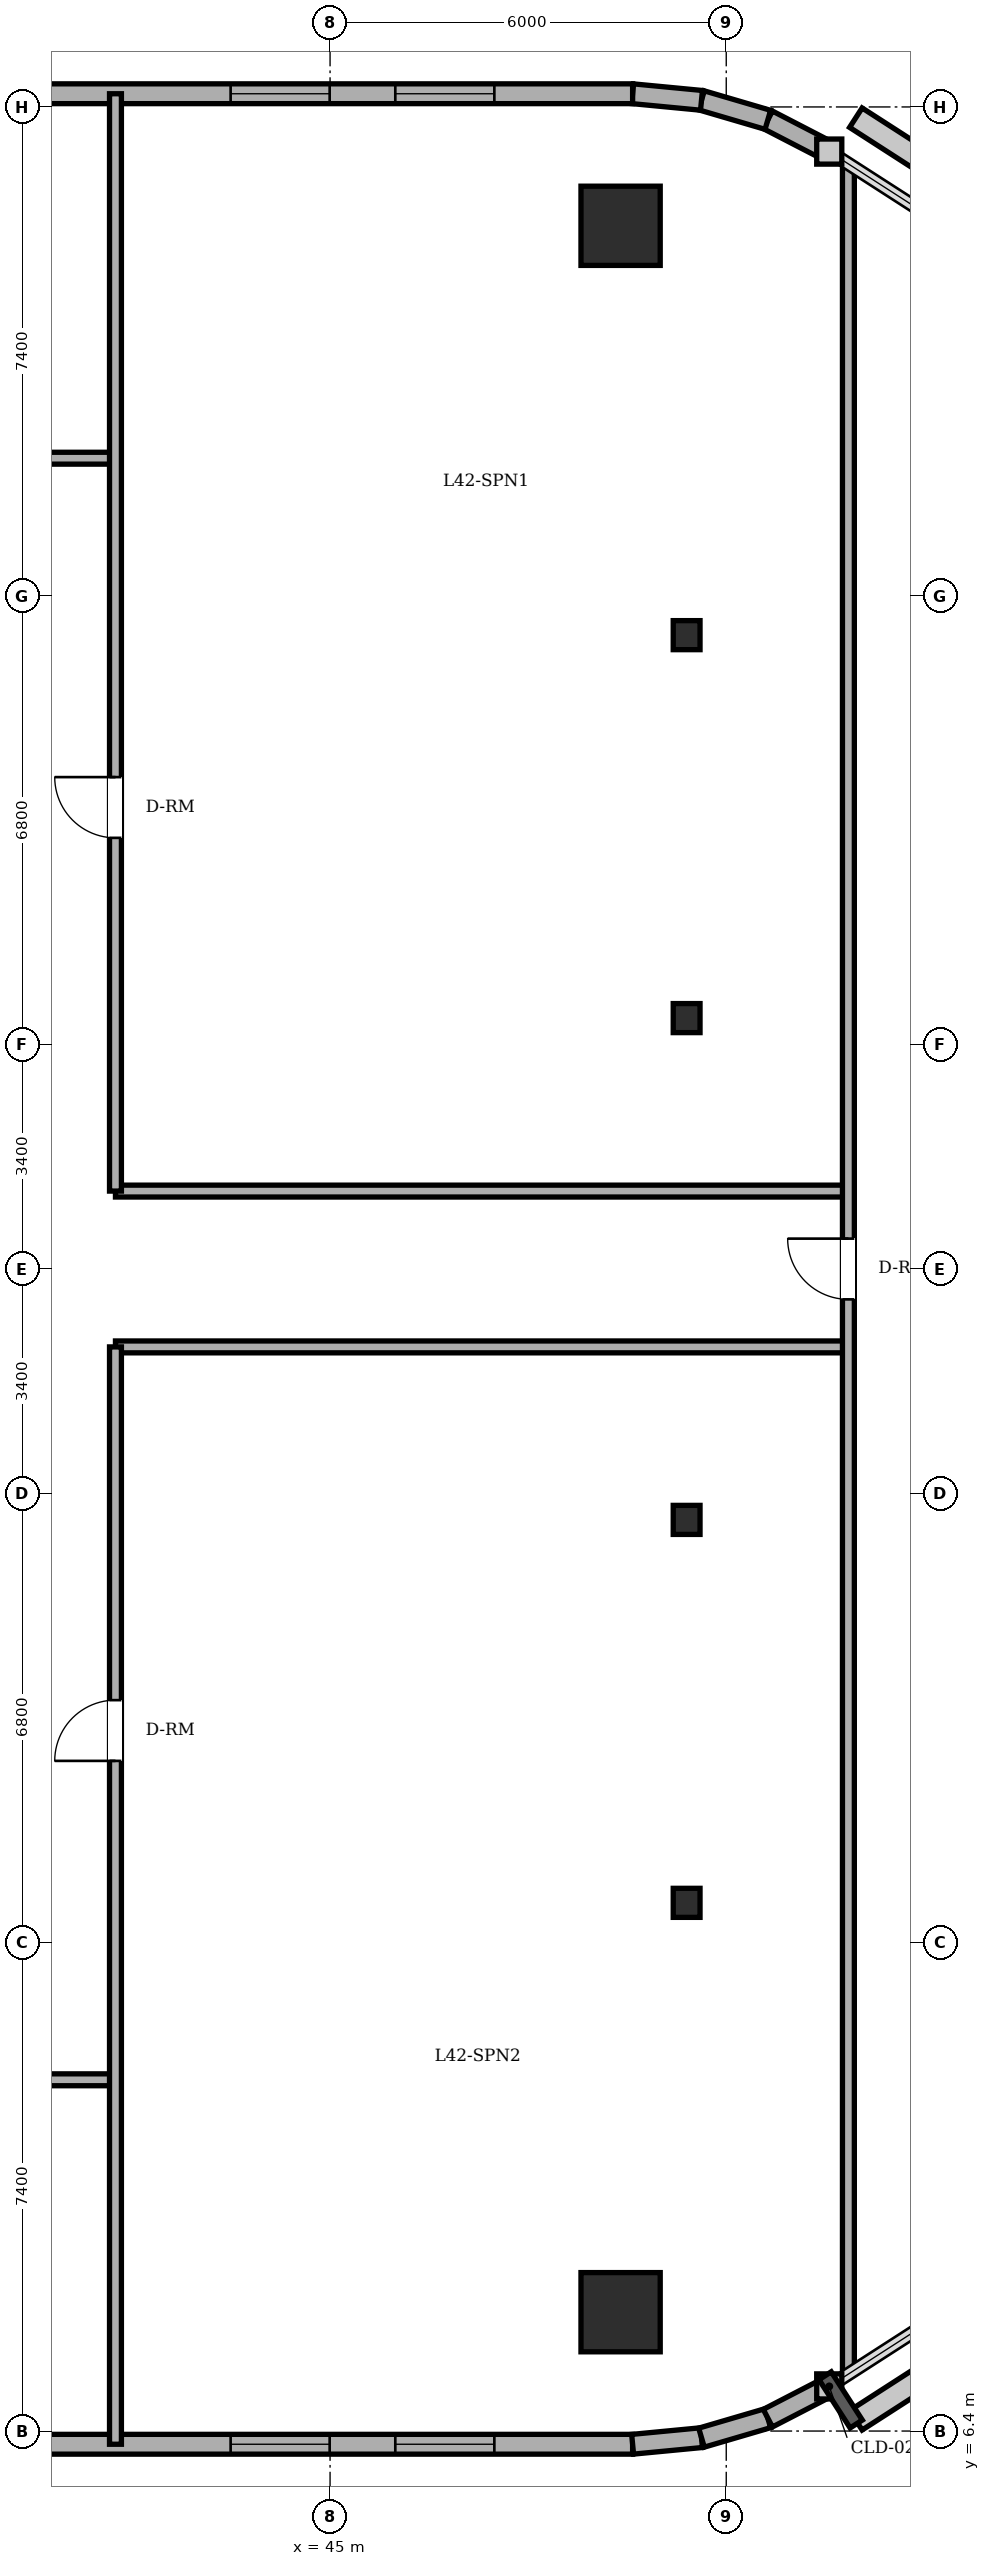
"""IFC4 building model, lengths in metres.
Left out: names, types, materials, properties, quantities, classifications, styles, units other than length and angle.
Written with IfcOpenShell. Run it as: python <this file> out.ifc"""

import sys

from ifc_helpers import new_model, si_unit, direction, frame, frame_2d, origin, origin_2d, place, context, subcontext, project, spatial, rectangle, circle, i_section, extrude, element, fill, save


model = new_model("IFC4")
c1 = context("Model", 3, precision=1e-05, world=origin(), true_north=direction((0.0, 1.0)))
c2 = subcontext(c1, "Body", "Model", "MODEL_VIEW")
j1 = project(units=[si_unit("LENGTHUNIT", "METRE"), si_unit("PLANEANGLEUNIT", "RADIAN")], contexts=[c1])
p1 = place(None, origin())
s1 = spatial("IfcSite", under=j1, at=p1, CompositionType="ELEMENT")
p2 = place(p1, origin())
s2 = spatial("IfcBuilding", under=s1, at=p2, CompositionType="ELEMENT")
p3 = place(p2, frame((0.0, 0.0, 161.8)))
s3 = spatial("IfcBuildingStorey", under=s2, at=p3, CompositionType="ELEMENT", Elevation=161.8)
for number, where, z_axis, x_axis in (
    (1, (49.4, 8.2, 0.0), (0.0, 0.0, 1.0), (1.0, 0.0, 0.0)),
    (2, (49.4, 39.8, 0.0), (0.0, 0.0, 1.0), (1.0, 0.0, 0.0)),
):
    element("IfcColumn", number, at=place(p3, frame(where, z_axis=z_axis, x_axis=x_axis)), inside=s3, PredefinedType="COLUMN", context=c2, shape_type="SweptSolid", body=[
        extrude(circle(Radius=0.6, at=origin_2d()), origin(), (0.0, 0.0, 1.0), 3.6),
    ])
for number, where, z_axis, x_axis in (
    (3, (50.4, 14.4, 0.0), (0.0, 0.0, 1.0), (1.0, 0.0, 0.0)),
    (4, (50.4, 20.2, 0.0), (0.0, 0.0, 1.0), (1.0, 0.0, 0.0)),
    (5, (50.4, 27.8, 0.0), (0.0, 0.0, 1.0), (1.0, 0.0, 0.0)),
    (6, (50.4, 33.6, 0.0), (0.0, 0.0, 1.0), (1.0, 0.0, 0.0)),
):
    element("IfcColumn", number, at=place(p3, frame(where, z_axis=z_axis, x_axis=x_axis)), inside=s3, PredefinedType="COLUMN", context=c2, shape_type="SweptSolid", body=[
        extrude(i_section(OverallWidth=0.406, OverallDepth=0.44, WebThickness=0.024, FlangeThickness=0.039, FilletRadius=0.015, at=origin_2d()), origin(), (0.0, 0.0, 1.0), 3.6),
    ])
p4 = place(p3, frame((19.3, 6.2, 0.0), z_axis=(0.0, 0.0, 1.0), x_axis=(1.0, 0.0, 0.0)))
e7 = element("IfcWall", 7, at=p4, inside=s3, PredefinedType="SOLIDWALL", context=c2, shape_type="SweptSolid", body=[
    extrude(rectangle(XDim=30.282, YDim=0.3, at=frame_2d((15.141, 0.0))), origin(), (0.0, 0.0, 1.0), 3.4),
])
p5 = place(p4, frame((10.1, 0.0, 0.0)))
e8 = element("IfcOpeningElement", 8, at=p5, cuts=e7, PredefinedType="OPENING", context=c2, shape_type="SweptSolid", body=[
    extrude(rectangle(XDim=0.95, YDim=2.2, at=frame_2d((0.475, 1.1))), frame((0.0, 0.16, 0.0), z_axis=(0.0, -1.0, 0.0), x_axis=(1.0, 0.0, 0.0)), (0.0, 0.0, 1.0), 0.32),
])
p6 = place(p4, frame((1.25, 0.0, 0.85)))
e9 = element("IfcOpeningElement", 9, at=p6, cuts=e7, PredefinedType="OPENING", context=c2, shape_type="SweptSolid", body=[
    extrude(rectangle(XDim=1.5, YDim=1.55, at=frame_2d((0.75, 0.775))), frame((0.0, 0.16, 0.0), z_axis=(0.0, -1.0, 0.0), x_axis=(1.0, 0.0, 0.0)), (0.0, 0.0, 1.0), 0.32),
])
p7 = place(p4, frame((2.9, 0.0, 0.85)))
e10 = element("IfcOpeningElement", 10, at=p7, cuts=e7, PredefinedType="OPENING", context=c2, shape_type="SweptSolid", body=[
    extrude(rectangle(XDim=1.5, YDim=1.55, at=frame_2d((0.75, 0.775))), frame((0.0, 0.16, 0.0), z_axis=(0.0, -1.0, 0.0), x_axis=(1.0, 0.0, 0.0)), (0.0, 0.0, 1.0), 0.32),
])
p8 = place(p4, frame((6.45, 0.0, 0.85)))
e11 = element("IfcOpeningElement", 11, at=p8, cuts=e7, PredefinedType="OPENING", context=c2, shape_type="SweptSolid", body=[
    extrude(rectangle(XDim=1.5, YDim=1.55, at=frame_2d((0.75, 0.775))), frame((0.0, 0.16, 0.0), z_axis=(0.0, -1.0, 0.0), x_axis=(1.0, 0.0, 0.0)), (0.0, 0.0, 1.0), 0.32),
])
p9 = place(p4, frame((12.8, 0.0, 0.85)))
e12 = element("IfcOpeningElement", 12, at=p9, cuts=e7, PredefinedType="OPENING", context=c2, shape_type="SweptSolid", body=[
    extrude(rectangle(XDim=1.5, YDim=1.55, at=frame_2d((0.75, 0.775))), frame((0.0, 0.16, 0.0), z_axis=(0.0, -1.0, 0.0), x_axis=(1.0, 0.0, 0.0)), (0.0, 0.0, 1.0), 0.32),
])
p10 = place(p4, frame((17.25, 0.0, 0.85)))
e13 = element("IfcOpeningElement", 13, at=p10, cuts=e7, PredefinedType="OPENING", context=c2, shape_type="SweptSolid", body=[
    extrude(rectangle(XDim=1.5, YDim=1.55, at=frame_2d((0.75, 0.775))), frame((0.0, 0.16, 0.0), z_axis=(0.0, -1.0, 0.0), x_axis=(1.0, 0.0, 0.0)), (0.0, 0.0, 1.0), 0.32),
])
p11 = place(p4, frame((24.194, 0.0, 0.85)))
e14 = element("IfcOpeningElement", 14, at=p11, cuts=e7, PredefinedType="OPENING", context=c2, shape_type="SweptSolid", body=[
    extrude(rectangle(XDim=1.5, YDim=1.55, at=frame_2d((0.75, 0.775))), frame((0.0, 0.16, 0.0), z_axis=(0.0, -1.0, 0.0), x_axis=(1.0, 0.0, 0.0)), (0.0, 0.0, 1.0), 0.32),
])
p12 = place(p4, frame((26.688, 0.0, 0.85)))
e15 = element("IfcOpeningElement", 15, at=p12, cuts=e7, PredefinedType="OPENING", context=c2, shape_type="SweptSolid", body=[
    extrude(rectangle(XDim=1.5, YDim=1.55, at=frame_2d((0.75, 0.775))), frame((0.0, 0.16, 0.0), z_axis=(0.0, -1.0, 0.0), x_axis=(1.0, 0.0, 0.0)), (0.0, 0.0, 1.0), 0.32),
])
p13 = place(p3, frame((49.582, 6.2, 0.0), z_axis=(0.0, 0.0, 1.0), x_axis=(0.995426089968, 0.095534807324, 0.0)))
e16 = element("IfcWall", 16, at=p13, inside=s3, PredefinedType="SOLIDWALL", context=c2, shape_type="SweptSolid", body=[
    extrude(rectangle(XDim=1.048, YDim=0.3, at=frame_2d((0.524, 0.0))), origin(), (0.0, 0.0, 1.0), 3.4),
])
p14 = place(p3, frame((50.625, 6.3, 0.0), z_axis=(0.0, 0.0, 1.0), x_axis=(0.959528674476, 0.281610942363, 0.0)))
e17 = element("IfcWall", 17, at=p14, inside=s3, PredefinedType="SOLIDWALL", context=c2, shape_type="SweptSolid", body=[
    extrude(rectangle(XDim=1.047, YDim=0.3, at=frame_2d((0.524, 0.0))), origin(), (0.0, 0.0, 1.0), 3.4),
])
for number, where, z_axis, x_axis in (
    (18, (51.63, 6.595, 0.0), (0.0, 0.0, 1.0), (0.888, 0.459, 0.0)),
    (19, (52.56, 40.924, 0.0), (0.0, 0.0, 1.0), (-0.888, 0.459, 0.0)),
):
    element("IfcWall", number, at=place(p3, frame(where, z_axis=z_axis, x_axis=x_axis)), inside=s3, PredefinedType="SOLIDWALL", context=c2, shape_type="SweptSolid", body=[
        extrude(rectangle(XDim=1.047, YDim=0.3, at=frame_2d((0.523, 0.0))), origin(), (0.0, 0.0, 1.0), 3.4),
    ])
p15 = place(p3, frame((51.63, 41.405, 0.0), z_axis=(0.0, 0.0, 1.0), x_axis=(-0.959528674476, 0.281610942363, 0.0)))
e20 = element("IfcWall", 20, at=p15, inside=s3, PredefinedType="SOLIDWALL", context=c2, shape_type="SweptSolid", body=[
    extrude(rectangle(XDim=1.047, YDim=0.3, at=frame_2d((0.524, 0.0))), origin(), (0.0, 0.0, 1.0), 3.4),
])
p16 = place(p3, frame((50.625, 41.7, 0.0), z_axis=(0.0, 0.0, 1.0), x_axis=(-0.995426089968, 0.095534807324, 0.0)))
e21 = element("IfcWall", 21, at=p16, inside=s3, PredefinedType="SOLIDWALL", context=c2, shape_type="SweptSolid", body=[
    extrude(rectangle(XDim=1.048, YDim=0.3, at=frame_2d((0.524, 0.0))), origin(), (0.0, 0.0, 1.0), 3.4),
])
p17 = place(p3, frame((49.582, 41.8, 0.0), z_axis=(0.0, 0.0, 1.0), x_axis=(-1.0, 0.0, 0.0)))
e22 = element("IfcWall", 22, at=p17, inside=s3, PredefinedType="SOLIDWALL", context=c2, shape_type="SweptSolid", body=[
    extrude(rectangle(XDim=30.282, YDim=0.3, at=frame_2d((15.141, 0.0))), origin(), (0.0, 0.0, 1.0), 3.4),
])
p18 = place(p17, frame((19.232, 0.0, 0.0)))
e23 = element("IfcOpeningElement", 23, at=p18, cuts=e22, PredefinedType="OPENING", context=c2, shape_type="SweptSolid", body=[
    extrude(rectangle(XDim=0.95, YDim=2.2, at=frame_2d((0.475, 1.1))), frame((0.0, 0.16, 0.0), z_axis=(0.0, -1.0, 0.0), x_axis=(1.0, 0.0, 0.0)), (0.0, 0.0, 1.0), 0.32),
])
p19 = place(p17, frame((2.094, 0.0, 0.85)))
e24 = element("IfcOpeningElement", 24, at=p19, cuts=e22, PredefinedType="OPENING", context=c2, shape_type="SweptSolid", body=[
    extrude(rectangle(XDim=1.5, YDim=1.55, at=frame_2d((0.75, 0.775))), frame((0.0, 0.16, 0.0), z_axis=(0.0, -1.0, 0.0), x_axis=(1.0, 0.0, 0.0)), (0.0, 0.0, 1.0), 0.32),
])
p20 = place(p17, frame((4.588, 0.0, 0.85)))
e25 = element("IfcOpeningElement", 25, at=p20, cuts=e22, PredefinedType="OPENING", context=c2, shape_type="SweptSolid", body=[
    extrude(rectangle(XDim=1.5, YDim=1.55, at=frame_2d((0.75, 0.775))), frame((0.0, 0.16, 0.0), z_axis=(0.0, -1.0, 0.0), x_axis=(1.0, 0.0, 0.0)), (0.0, 0.0, 1.0), 0.32),
])
p21 = place(p17, frame((10.399, 0.0, 0.85)))
e26 = element("IfcOpeningElement", 26, at=p21, cuts=e22, PredefinedType="OPENING", context=c2, shape_type="SweptSolid", body=[
    extrude(rectangle(XDim=1.5, YDim=1.55, at=frame_2d((0.75, 0.775))), frame((0.0, 0.16, 0.0), z_axis=(0.0, -1.0, 0.0), x_axis=(1.0, 0.0, 0.0)), (0.0, 0.0, 1.0), 0.32),
])
p22 = place(p17, frame((13.715, 0.0, 0.85)))
e27 = element("IfcOpeningElement", 27, at=p22, cuts=e22, PredefinedType="OPENING", context=c2, shape_type="SweptSolid", body=[
    extrude(rectangle(XDim=1.5, YDim=1.55, at=frame_2d((0.75, 0.775))), frame((0.0, 0.16, 0.0), z_axis=(0.0, -1.0, 0.0), x_axis=(1.0, 0.0, 0.0)), (0.0, 0.0, 1.0), 0.32),
])
p23 = place(p17, frame((22.532, 0.0, 0.85)))
e28 = element("IfcOpeningElement", 28, at=p23, cuts=e22, PredefinedType="OPENING", context=c2, shape_type="SweptSolid", body=[
    extrude(rectangle(XDim=1.5, YDim=1.55, at=frame_2d((0.75, 0.775))), frame((0.0, 0.16, 0.0), z_axis=(0.0, -1.0, 0.0), x_axis=(1.0, 0.0, 0.0)), (0.0, 0.0, 1.0), 0.32),
])
p24 = place(p17, frame((25.882, 0.0, 0.85)))
e29 = element("IfcOpeningElement", 29, at=p24, cuts=e22, PredefinedType="OPENING", context=c2, shape_type="SweptSolid", body=[
    extrude(rectangle(XDim=1.5, YDim=1.55, at=frame_2d((0.75, 0.775))), frame((0.0, 0.16, 0.0), z_axis=(0.0, -1.0, 0.0), x_axis=(1.0, 0.0, 0.0)), (0.0, 0.0, 1.0), 0.32),
])
p25 = place(p17, frame((27.532, 0.0, 0.85)))
e30 = element("IfcOpeningElement", 30, at=p25, cuts=e22, PredefinedType="OPENING", context=c2, shape_type="SweptSolid", body=[
    extrude(rectangle(XDim=1.5, YDim=1.55, at=frame_2d((0.75, 0.775))), frame((0.0, 0.16, 0.0), z_axis=(0.0, -1.0, 0.0), x_axis=(1.0, 0.0, 0.0)), (0.0, 0.0, 1.0), 0.32),
])
p26 = place(p3, frame((13.8, 11.72, 0.0), z_axis=(0.0, 0.0, 1.0), x_axis=(1.0, 0.0, 0.0)))
e31 = element("IfcWall", 31, at=p26, inside=s3, PredefinedType="PARTITIONING", context=c2, shape_type="SweptSolid", body=[
    extrude(rectangle(XDim=27.95, YDim=0.18, at=frame_2d((13.975, 0.0))), origin(), (0.0, 0.0, 1.0), 3.4),
])
p27 = place(p26, frame((12.24, 0.0, 0.0)))
e32 = element("IfcOpeningElement", 32, at=p27, cuts=e31, PredefinedType="OPENING", context=c2, shape_type="SweptSolid", body=[
    extrude(rectangle(XDim=0.92, YDim=2.1, at=frame_2d((0.46, 1.05))), frame((0.0, 0.1, 0.0), z_axis=(0.0, -1.0, 0.0), x_axis=(1.0, 0.0, 0.0)), (0.0, 0.0, 1.0), 0.2),
])
p28 = place(p26, frame((5.54, 0.0, 0.0)))
e33 = element("IfcOpeningElement", 33, at=p28, cuts=e31, PredefinedType="OPENING", context=c2, shape_type="SweptSolid", body=[
    extrude(rectangle(XDim=0.92, YDim=2.1, at=frame_2d((0.46, 1.05))), frame((0.0, 0.1, 0.0), z_axis=(0.0, -1.0, 0.0), x_axis=(1.0, 0.0, 0.0)), (0.0, 0.0, 1.0), 0.2),
])
p29 = place(p26, frame((20.555, 0.0, 0.0)))
e34 = element("IfcOpeningElement", 34, at=p29, cuts=e31, PredefinedType="OPENING", context=c2, shape_type="SweptSolid", body=[
    extrude(rectangle(XDim=0.92, YDim=2.1, at=frame_2d((0.46, 1.05))), frame((0.0, 0.1, 0.0), z_axis=(0.0, -1.0, 0.0), x_axis=(1.0, 0.0, 0.0)), (0.0, 0.0, 1.0), 0.2),
])
for number, where, z_axis, x_axis in (
    (35, (41.75, 22.82, 0.0), (0.0, 0.0, 1.0), (1.0, 0.0, 0.0)),
    (36, (41.75, 25.18, 0.0), (0.0, 0.0, 1.0), (1.0, 0.0, 0.0)),
):
    element("IfcWall", number, at=place(p3, frame(where, z_axis=z_axis, x_axis=x_axis)), inside=s3, PredefinedType="PARTITIONING", context=c2, shape_type="SweptSolid", body=[
        extrude(rectangle(XDim=11.1, YDim=0.18, at=frame_2d((5.55, 0.0))), origin(), (0.0, 0.0, 1.0), 3.4),
    ])
p30 = place(p3, frame((13.8, 36.28, 0.0), z_axis=(0.0, 0.0, 1.0), x_axis=(1.0, 0.0, 0.0)))
e37 = element("IfcWall", 37, at=p30, inside=s3, PredefinedType="PARTITIONING", context=c2, shape_type="SweptSolid", body=[
    extrude(rectangle(XDim=27.95, YDim=0.18, at=frame_2d((13.975, 0.0))), origin(), (0.0, 0.0, 1.0), 3.4),
])
p31 = place(p30, frame((12.05, 0.0, 0.0)))
e38 = element("IfcOpeningElement", 38, at=p31, cuts=e37, PredefinedType="OPENING", context=c2, shape_type="SweptSolid", body=[
    extrude(rectangle(XDim=0.9, YDim=2.1, at=frame_2d((0.45, 1.05))), frame((0.0, 0.1, 0.0), z_axis=(0.0, -1.0, 0.0), x_axis=(1.0, 0.0, 0.0)), (0.0, 0.0, 1.0), 0.2),
])
p32 = place(p30, frame((15.67, 0.0, 0.0)))
e39 = element("IfcOpeningElement", 39, at=p32, cuts=e37, PredefinedType="OPENING", context=c2, shape_type="SweptSolid", body=[
    extrude(rectangle(XDim=0.86, YDim=2.1, at=frame_2d((0.43, 1.05))), frame((0.0, 0.1, 0.0), z_axis=(0.0, -1.0, 0.0), x_axis=(1.0, 0.0, 0.0)), (0.0, 0.0, 1.0), 0.2),
])
p33 = place(p30, frame((5.54, 0.0, 0.0)))
e40 = element("IfcOpeningElement", 40, at=p33, cuts=e37, PredefinedType="OPENING", context=c2, shape_type="SweptSolid", body=[
    extrude(rectangle(XDim=0.92, YDim=2.1, at=frame_2d((0.46, 1.05))), frame((0.0, 0.1, 0.0), z_axis=(0.0, -1.0, 0.0), x_axis=(1.0, 0.0, 0.0)), (0.0, 0.0, 1.0), 0.2),
])
p34 = place(p30, frame((22.215, 0.0, 0.0)))
e41 = element("IfcOpeningElement", 41, at=p34, cuts=e37, PredefinedType="OPENING", context=c2, shape_type="SweptSolid", body=[
    extrude(rectangle(XDim=1.0, YDim=2.15, at=frame_2d((0.5, 1.075))), frame((0.0, 0.1, 0.0), z_axis=(0.0, -1.0, 0.0), x_axis=(1.0, 0.0, 0.0)), (0.0, 0.0, 1.0), 0.2),
])
p35 = place(p3, frame((41.75, 6.2, 0.0), z_axis=(0.0, 0.0, 1.0), x_axis=(0.0, 1.0, 0.0)))
e42 = element("IfcWall", 42, at=p35, inside=s3, PredefinedType="PARTITIONING", context=c2, shape_type="SweptSolid", body=[
    extrude(rectangle(XDim=16.62, YDim=0.18, at=frame_2d((8.31, 0.0))), origin(), (0.0, 0.0, 1.0), 3.4),
])
p36 = place(p35, frame((10.35, 0.0, 0.0)))
e43 = element("IfcOpeningElement", 43, at=p36, cuts=e42, PredefinedType="OPENING", context=c2, shape_type="SweptSolid", body=[
    extrude(rectangle(XDim=0.92, YDim=2.1, at=frame_2d((0.46, 1.05))), frame((0.0, 0.1, 0.0), z_axis=(0.0, -1.0, 0.0), x_axis=(1.0, 0.0, 0.0)), (0.0, 0.0, 1.0), 0.2),
])
p37 = place(p3, frame((41.75, 25.18, 0.0), z_axis=(0.0, 0.0, 1.0), x_axis=(0.0, 1.0, 0.0)))
e44 = element("IfcWall", 44, at=p37, inside=s3, PredefinedType="PARTITIONING", context=c2, shape_type="SweptSolid", body=[
    extrude(rectangle(XDim=16.62, YDim=0.18, at=frame_2d((8.31, 0.0))), origin(), (0.0, 0.0, 1.0), 3.4),
])
p38 = place(p37, frame((5.35, 0.0, 0.0)))
e45 = element("IfcOpeningElement", 45, at=p38, cuts=e44, PredefinedType="OPENING", context=c2, shape_type="SweptSolid", body=[
    extrude(rectangle(XDim=0.92, YDim=2.1, at=frame_2d((0.46, 1.05))), frame((0.0, 0.1, 0.0), z_axis=(0.0, -1.0, 0.0), x_axis=(1.0, 0.0, 0.0)), (0.0, 0.0, 1.0), 0.2),
])
p39 = place(p3, frame((52.85, 7.263, 0.0), z_axis=(0.0, 0.0, 1.0), x_axis=(0.0, 1.0, 0.0)))
e46 = element("IfcWall", 46, at=p39, inside=s3, PredefinedType="PARTITIONING", context=c2, shape_type="SweptSolid", body=[
    extrude(rectangle(XDim=33.474, YDim=0.18, at=frame_2d((16.737, 0.0))), origin(), (0.0, 0.0, 1.0), 3.4),
])
p40 = place(p39, frame((16.277, 0.0, 0.0)))
e47 = element("IfcOpeningElement", 47, at=p40, cuts=e46, PredefinedType="OPENING", context=c2, shape_type="SweptSolid", body=[
    extrude(rectangle(XDim=0.92, YDim=2.1, at=frame_2d((0.46, 1.05))), frame((0.0, 0.1, 0.0), z_axis=(0.0, -1.0, 0.0), x_axis=(1.0, 0.0, 0.0)), (0.0, 0.0, 1.0), 0.2),
])
p41 = place(p11, origin())
e48 = element("IfcWindow", 48, at=p41, inside=s3, PartitioningType="DOUBLE_PANEL_VERTICAL", PredefinedType="WINDOW", context=c2, shape_type="SweptSolid", body=[
    extrude(rectangle(XDim=1.5, YDim=1.55, at=frame_2d((0.75, 0.775))), frame((0.0, 0.03, 0.0), z_axis=(0.0, -1.0, 0.0), x_axis=(1.0, 0.0, 0.0)), (0.0, 0.0, 1.0), 0.06),
])
fill(e14, e48)
p42 = place(p12, origin())
e49 = element("IfcWindow", 49, at=p42, inside=s3, PartitioningType="DOUBLE_PANEL_VERTICAL", PredefinedType="WINDOW", context=c2, shape_type="SweptSolid", body=[
    extrude(rectangle(XDim=1.5, YDim=1.55, at=frame_2d((0.75, 0.775))), frame((0.0, 0.03, 0.0), z_axis=(0.0, -1.0, 0.0), x_axis=(1.0, 0.0, 0.0)), (0.0, 0.0, 1.0), 0.06),
])
fill(e15, e49)
p43 = place(p19, origin())
e50 = element("IfcWindow", 50, at=p43, inside=s3, PartitioningType="DOUBLE_PANEL_VERTICAL", PredefinedType="WINDOW", context=c2, shape_type="SweptSolid", body=[
    extrude(rectangle(XDim=1.5, YDim=1.55, at=frame_2d((0.75, 0.775))), frame((0.0, 0.03, 0.0), z_axis=(0.0, -1.0, 0.0), x_axis=(1.0, 0.0, 0.0)), (0.0, 0.0, 1.0), 0.06),
])
fill(e24, e50)
p44 = place(p20, origin())
e51 = element("IfcWindow", 51, at=p44, inside=s3, PartitioningType="DOUBLE_PANEL_VERTICAL", PredefinedType="WINDOW", context=c2, shape_type="SweptSolid", body=[
    extrude(rectangle(XDim=1.5, YDim=1.55, at=frame_2d((0.75, 0.775))), frame((0.0, 0.03, 0.0), z_axis=(0.0, -1.0, 0.0), x_axis=(1.0, 0.0, 0.0)), (0.0, 0.0, 1.0), 0.06),
])
fill(e25, e51)
p45 = place(p38, origin())
e52 = element("IfcDoor", 52, at=p45, inside=s3, OperationType="SINGLE_SWING_RIGHT", PredefinedType="DOOR", context=c2, shape_type="SweptSolid", body=[
    extrude(rectangle(XDim=0.92, YDim=2.1, at=frame_2d((0.46, 1.05))), frame((0.0, 0.025, 0.0), z_axis=(0.0, -1.0, 0.0), x_axis=(1.0, 0.0, 0.0)), (0.0, 0.0, 1.0), 0.05),
])
fill(e45, e52)
p46 = place(p36, origin())
e53 = element("IfcDoor", 53, at=p46, inside=s3, OperationType="SINGLE_SWING_LEFT", PredefinedType="DOOR", context=c2, shape_type="SweptSolid", body=[
    extrude(rectangle(XDim=0.92, YDim=2.1, at=frame_2d((0.46, 1.05))), frame((0.0, 0.025, 0.0), z_axis=(0.0, -1.0, 0.0), x_axis=(1.0, 0.0, 0.0)), (0.0, 0.0, 1.0), 0.05),
])
fill(e43, e53)
p47 = place(p40, origin())
e54 = element("IfcDoor", 54, at=p47, inside=s3, OperationType="SINGLE_SWING_RIGHT", PredefinedType="DOOR", context=c2, shape_type="SweptSolid", body=[
    extrude(rectangle(XDim=0.92, YDim=2.1, at=frame_2d((0.46, 1.05))), frame((0.0, 0.025, 0.0), z_axis=(0.0, -1.0, 0.0), x_axis=(1.0, 0.0, 0.0)), (0.0, 0.0, 1.0), 0.05),
])
fill(e47, e54)
save(model, sys.argv[1])
